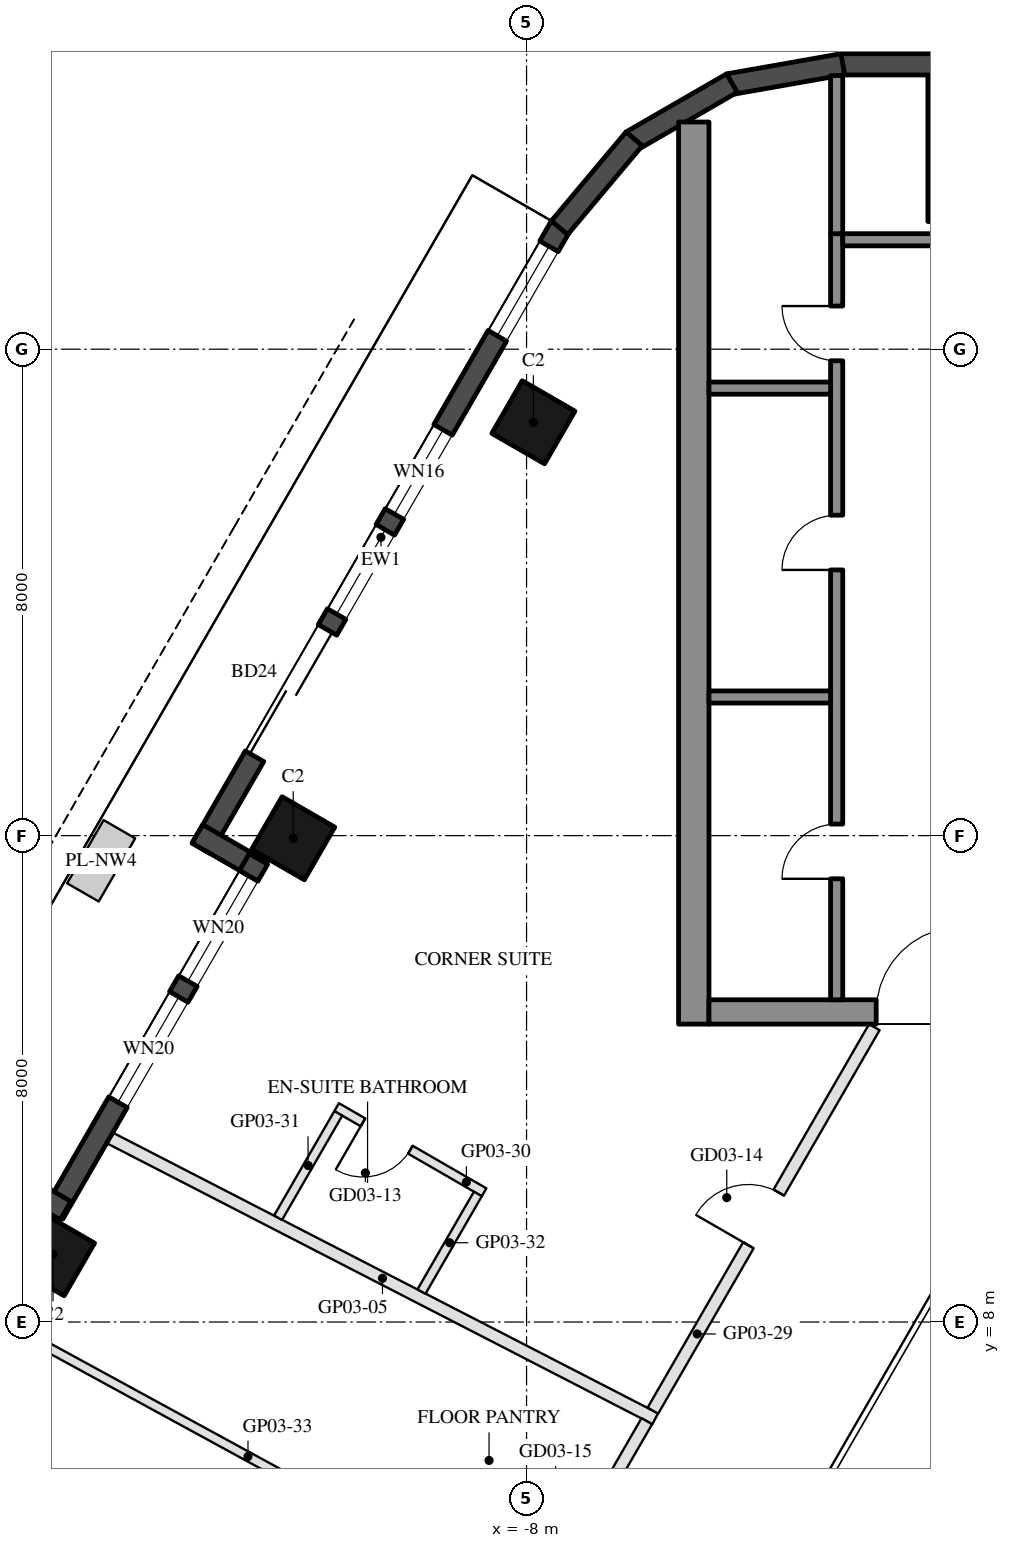
"""IFC4 building model, lengths in metres.
Left out: names, types, materials, properties, quantities, classifications, styles, units other than length and angle.
Written with IfcOpenShell. Run it as: python <this file> out.ifc"""

import sys

from ifc_helpers import new_model, si_unit, direction, frame, frame_2d, origin, origin_2d, place, context, subcontext, project, spatial, rectangle, hollow_rectangle, extrude, element, fill, save


model = new_model("IFC4")
c1 = context("Model", 3, precision=1e-05, world=origin(), true_north=direction((0.0, 1.0)))
c2 = subcontext(c1, "Body", "Model", "MODEL_VIEW")
j1 = project(units=[si_unit("LENGTHUNIT", "METRE"), si_unit("PLANEANGLEUNIT", "RADIAN")], contexts=[c1])
p1 = place(None, origin())
s1 = spatial("IfcSite", under=j1, at=p1, CompositionType="ELEMENT")
p2 = place(p1, origin())
s2 = spatial("IfcBuilding", under=s1, at=p2, CompositionType="ELEMENT")
p3 = place(p2, frame((0.0, 0.0, 65.0)))
s3 = spatial("IfcBuildingStorey", under=s2, at=p3, CompositionType="ELEMENT", Elevation=65.0)
for number, where, z_axis, x_axis in (
    (1, (-7.888, 22.798, 0.0), (0.0, 0.0, 1.0), (0.5, 0.866, 0.0)),
    (2, (-11.838, 15.957, 0.0), (0.0, 0.0, 1.0), (0.5, 0.866, 0.0)),
    (3, (-15.788, 9.115, 0.0), (0.0, 0.0, 1.0), (0.5, 0.866, 0.0)),
):
    element("IfcColumn", number, at=place(p3, frame(where, z_axis=z_axis, x_axis=x_axis)), inside=s3, PredefinedType="COLUMN", context=c2, shape_type="SweptSolid", body=[
        extrude(hollow_rectangle(XDim=1.0, YDim=1.0, WallThickness=0.045, at=origin_2d()), origin(), (0.0, 0.0, 1.0), 3.7),
    ])
p4 = place(p3, frame((0.0, 27.3, 0.0), z_axis=(0.0, 0.0, 1.0), x_axis=(1.0, 0.0, 0.0)))
e4 = element("IfcColumn", 4, at=p4, inside=s3, PredefinedType="COLUMN", context=c2, shape_type="SweptSolid", body=[
    extrude(hollow_rectangle(XDim=2.8, YDim=2.4, WallThickness=0.07, at=origin_2d()), origin(), (0.0, 0.0, 1.0), 3.7),
])
p5 = place(p3, frame((-7.441, 26.022, 0.0), z_axis=(0.0, 0.0, 1.0), x_axis=(-0.499992533062, -0.86602971478, 0.0)))
e5 = element("IfcWall", 5, at=p5, inside=s3, PredefinedType="SOLIDWALL", context=c2, shape_type="SweptSolid", body=[
    extrude(rectangle(XDim=11.816, YDim=0.35, at=frame_2d((5.908, 0.0))), origin(), (0.0, 0.0, 1.0), 3.55),
])
p6 = place(p5, frame((0.381, 0.0, 0.3)))
e6 = element("IfcOpeningElement", 6, at=p6, cuts=e5, PredefinedType="OPENING", context=c2, shape_type="SweptSolid", body=[
    extrude(rectangle(XDim=1.7, YDim=2.65, at=frame_2d((0.85, 1.325))), frame((0.0, 0.185, 0.0), z_axis=(0.0, -1.0, 0.0), x_axis=(1.0, 0.0, 0.0)), (0.0, 0.0, 1.0), 0.37),
])
p7 = place(p5, frame((7.666, 0.0, 0.0)))
e7 = element("IfcOpeningElement", 7, at=p7, cuts=e5, PredefinedType="OPENING", context=c2, shape_type="SweptSolid", body=[
    extrude(rectangle(XDim=2.4, YDim=2.4, at=frame_2d((1.2, 1.2))), frame((0.0, 0.185, 0.0), z_axis=(0.0, -1.0, 0.0), x_axis=(1.0, 0.0, 0.0)), (0.0, 0.0, 1.0), 0.37),
])
p8 = place(p5, frame((3.865, 0.0, 0.3)))
e8 = element("IfcOpeningElement", 8, at=p8, cuts=e5, PredefinedType="OPENING", context=c2, shape_type="SweptSolid", body=[
    extrude(rectangle(XDim=1.6, YDim=2.65, at=frame_2d((0.8, 1.325))), frame((0.0, 0.185, 0.0), z_axis=(0.0, -1.0, 0.0), x_axis=(1.0, 0.0, 0.0)), (0.0, 0.0, 1.0), 0.37),
])
p9 = place(p5, frame((5.765, 0.0, 0.3)))
e9 = element("IfcOpeningElement", 9, at=p9, cuts=e5, PredefinedType="OPENING", context=c2, shape_type="SweptSolid", body=[
    extrude(rectangle(XDim=1.6, YDim=2.65, at=frame_2d((0.8, 1.325))), frame((0.0, 0.185, 0.0), z_axis=(0.0, -1.0, 0.0), x_axis=(1.0, 0.0, 0.0)), (0.0, 0.0, 1.0), 0.37),
])
p10 = place(p3, frame((-13.413, 16.029, 0.0), z_axis=(0.0, 0.0, 1.0), x_axis=(0.866005645448, -0.500034220881, 0.0)))
e10 = element("IfcWall", 10, at=p10, inside=s3, PredefinedType="SOLIDWALL", context=c2, shape_type="SweptSolid", body=[
    extrude(rectangle(XDim=1.22, YDim=0.35, at=frame_2d((0.61, 0.0))), origin(), (0.0, 0.0, 1.0), 3.55),
])
p11 = place(p3, frame((-12.409, 15.617, 0.0), z_axis=(0.0, 0.0, 1.0), x_axis=(-0.500003597184, -0.866023326939, 0.0)))
e11 = element("IfcWall", 11, at=p11, inside=s3, PredefinedType="SOLIDWALL", context=c2, shape_type="SweptSolid", body=[
    extrude(rectangle(XDim=6.74, YDim=0.35, at=frame_2d((3.37, 0.0))), origin(), (0.0, 0.0, 1.0), 3.55),
])
p12 = place(p11, frame((0.32, 0.0, 0.3)))
e12 = element("IfcOpeningElement", 12, at=p12, cuts=e11, PredefinedType="OPENING", context=c2, shape_type="SweptSolid", body=[
    extrude(rectangle(XDim=2.0, YDim=2.65, at=frame_2d((1.0, 1.325))), frame((0.0, 0.185, 0.0), z_axis=(0.0, -1.0, 0.0), x_axis=(1.0, 0.0, 0.0)), (0.0, 0.0, 1.0), 0.37),
])
p13 = place(p11, frame((2.62, 0.0, 0.3)))
e13 = element("IfcOpeningElement", 13, at=p13, cuts=e11, PredefinedType="OPENING", context=c2, shape_type="SweptSolid", body=[
    extrude(rectangle(XDim=2.0, YDim=2.65, at=frame_2d((1.0, 1.325))), frame((0.0, 0.185, 0.0), z_axis=(0.0, -1.0, 0.0), x_axis=(1.0, 0.0, 0.0)), (0.0, 0.0, 1.0), 0.37),
])
p14 = place(p3, frame((-15.581, 9.833, 0.0), z_axis=(0.0, 0.0, 1.0), x_axis=(-0.866055662726, 0.499947586314, 0.0)))
e14 = element("IfcWall", 14, at=p14, inside=s3, PredefinedType="SOLIDWALL", context=c2, shape_type="SweptSolid", body=[
    extrude(rectangle(XDim=1.22, YDim=0.35, at=frame_2d((0.61, 0.0))), origin(), (0.0, 0.0, 1.0), 3.55),
])
p15 = place(p3, frame((2.829, 28.685, 0.0), z_axis=(0.0, 0.0, 1.0), x_axis=(-1.0, 0.0, 0.0)))
e15 = element("IfcWall", 15, at=p15, inside=s3, PredefinedType="SOLIDWALL", context=c2, shape_type="SweptSolid", body=[
    extrude(rectangle(XDim=5.658, YDim=0.35, at=frame_2d((2.829, 0.0))), origin(), (0.0, 0.0, 1.0), 3.55),
])
for number, where, z_axis, x_axis in (
    (16, (-2.799, 28.688, 0.0), (0.0, 0.0, 1.0), (-0.985, -0.174, 0.0)),
    (17, (-4.623, 28.377, 0.0), (0.0, 0.0, 1.0), (-0.866, -0.5, 0.0)),
):
    element("IfcWall", number, at=place(p3, frame(where, z_axis=z_axis, x_axis=x_axis)), inside=s3, PredefinedType="SOLIDWALL", context=c2, shape_type="SweptSolid", body=[
        extrude(rectangle(XDim=1.91, YDim=0.35, at=frame_2d((0.955, 0.0))), origin(), (0.0, 0.0, 1.0), 3.55),
    ])
p16 = place(p3, frame((-6.23, 27.461, 0.0), z_axis=(0.0, 0.0, 1.0), x_axis=(-0.642808304945, -0.766027077259, 0.0)))
e18 = element("IfcWall", 18, at=p16, inside=s3, PredefinedType="SOLIDWALL", context=c2, shape_type="SweptSolid", body=[
    extrude(rectangle(XDim=1.91, YDim=0.35, at=frame_2d((0.955, 0.0))), origin(), (0.0, 0.0, 1.0), 3.55),
])
p17 = place(p3, frame((-5.25, 12.9, 0.0), z_axis=(0.0, 0.0, 1.0), x_axis=(0.0, 1.0, 0.0)))
e19 = element("IfcWall", 19, at=p17, inside=s3, PredefinedType="SHEAR", context=c2, shape_type="SweptSolid", body=[
    extrude(rectangle(XDim=14.837, YDim=0.5, at=frame_2d((7.418, 0.0))), origin(), (0.0, 0.0, 1.0), 3.5),
])
p18 = place(p3, frame((5.0, 13.1, 0.0), z_axis=(0.0, 0.0, 1.0), x_axis=(-1.0, 0.0, 0.0)))
e20 = element("IfcWall", 20, at=p18, inside=s3, PredefinedType="SHEAR", context=c2, shape_type="SweptSolid", body=[
    extrude(rectangle(XDim=10.0, YDim=0.4, at=frame_2d((5.0, 0.0))), origin(), (0.0, 0.0, 1.0), 3.5),
])
p19 = place(p18, frame((3.55, 0.0, 0.0)))
e21 = element("IfcOpeningElement", 21, at=p19, cuts=e20, PredefinedType="OPENING", context=c2, shape_type="SweptSolid", body=[
    extrude(rectangle(XDim=1.1, YDim=2.1, at=frame_2d((0.55, 1.05))), frame((0.0, 0.21, 0.0), z_axis=(0.0, -1.0, 0.0), x_axis=(1.0, 0.0, 0.0)), (0.0, 0.0, 1.0), 0.42),
])
p20 = place(p18, frame((5.85, 0.0, 0.0)))
e22 = element("IfcOpeningElement", 22, at=p20, cuts=e20, PredefinedType="OPENING", context=c2, shape_type="SweptSolid", body=[
    extrude(rectangle(XDim=1.4, YDim=2.1, at=frame_2d((0.7, 1.05))), frame((0.0, 0.21, 0.0), z_axis=(0.0, -1.0, 0.0), x_axis=(1.0, 0.0, 0.0)), (0.0, 0.0, 1.0), 0.42),
])
p21 = place(p3, frame((-2.9, 13.3, 0.0), z_axis=(0.0, 0.0, 1.0), x_axis=(0.0, 1.0, 0.0)))
e23 = element("IfcWall", 23, at=p21, inside=s3, PredefinedType="SHEAR", context=c2, shape_type="SweptSolid", body=[
    extrude(rectangle(XDim=12.6, YDim=0.2, at=frame_2d((6.3, 0.0))), origin(), (0.0, 0.0, 1.0), 3.5),
])
p22 = place(p21, frame((1.99, 0.0, 0.0)))
e24 = element("IfcOpeningElement", 24, at=p22, cuts=e23, PredefinedType="OPENING", context=c2, shape_type="SweptSolid", body=[
    extrude(rectangle(XDim=0.9, YDim=2.1, at=frame_2d((0.45, 1.05))), frame((0.0, 0.11, 0.0), z_axis=(0.0, -1.0, 0.0), x_axis=(1.0, 0.0, 0.0)), (0.0, 0.0, 1.0), 0.22),
])
p23 = place(p21, frame((7.07, 0.0, 0.0)))
e25 = element("IfcOpeningElement", 25, at=p23, cuts=e23, PredefinedType="OPENING", context=c2, shape_type="SweptSolid", body=[
    extrude(rectangle(XDim=0.9, YDim=2.1, at=frame_2d((0.45, 1.05))), frame((0.0, 0.11, 0.0), z_axis=(0.0, -1.0, 0.0), x_axis=(1.0, 0.0, 0.0)), (0.0, 0.0, 1.0), 0.22),
])
p24 = place(p21, frame((10.51, 0.0, 0.0)))
e26 = element("IfcOpeningElement", 26, at=p24, cuts=e23, PredefinedType="OPENING", context=c2, shape_type="SweptSolid", body=[
    extrude(rectangle(XDim=0.9, YDim=2.1, at=frame_2d((0.45, 1.05))), frame((0.0, 0.11, 0.0), z_axis=(0.0, -1.0, 0.0), x_axis=(1.0, 0.0, 0.0)), (0.0, 0.0, 1.0), 0.22),
])
p25 = place(p3, frame((-0.4, 25.8, 0.0), z_axis=(0.0, 0.0, 1.0), x_axis=(-1.0, 0.0, 0.0)))
e27 = element("IfcWall", 27, at=p25, inside=s3, PredefinedType="SHEAR", context=c2, shape_type="SweptSolid", body=[
    extrude(rectangle(XDim=2.4, YDim=0.2, at=frame_2d((1.2, 0.0))), origin(), (0.0, 0.0, 1.0), 3.5),
])
for number, where, z_axis, x_axis in (
    (28, (-3.0, 18.28, 0.0), (0.0, 0.0, 1.0), (-1.0, 0.0, 0.0)),
    (29, (-3.0, 23.36, 0.0), (0.0, 0.0, 1.0), (-1.0, 0.0, 0.0)),
):
    element("IfcWall", number, at=place(p3, frame(where, z_axis=z_axis, x_axis=x_axis)), inside=s3, PredefinedType="SHEAR", context=c2, shape_type="SweptSolid", body=[
        extrude(rectangle(XDim=2.0, YDim=0.2, at=frame_2d((1.0, 0.0))), origin(), (0.0, 0.0, 1.0), 3.5),
    ])
p26 = place(p3, frame((-2.9, 25.9, 0.0), z_axis=(0.0, 0.0, 1.0), x_axis=(0.0, 1.0, 0.0)))
e30 = element("IfcWall", 30, at=p26, inside=s3, PredefinedType="SHEAR", context=c2, shape_type="SweptSolid", body=[
    extrude(rectangle(XDim=2.6, YDim=0.2, at=frame_2d((1.3, 0.0))), origin(), (0.0, 0.0, 1.0), 3.5),
])
p27 = place(p3, frame((-14.856, 11.029, 0.0), z_axis=(0.0, 0.0, 1.0), x_axis=(0.889105841633, -0.457701652142, 0.0)))
e31 = element("IfcWall", 31, at=p27, inside=s3, PredefinedType="PARTITIONING", context=c2, shape_type="SweptSolid", body=[
    extrude(rectangle(XDim=10.092, YDim=0.2, at=frame_2d((5.046, 0.0))), origin(), (0.0, 0.0, 1.0), 2.96),
])
p28 = place(p3, frame((-5.922, 6.542, 0.0), z_axis=(0.0, 0.0, 1.0), x_axis=(0.499989401968, 0.866031522475, 0.0)))
e32 = element("IfcWall", 32, at=p28, inside=s3, PredefinedType="PARTITIONING", context=c2, shape_type="SweptSolid", body=[
    extrude(rectangle(XDim=7.283, YDim=0.2, at=frame_2d((3.642, 0.0))), origin(), (0.0, 0.0, 1.0), 2.95),
])
p29 = place(p28, frame((3.142, 0.0, 0.0)))
e33 = element("IfcOpeningElement", 33, at=p29, cuts=e32, PredefinedType="OPENING", context=c2, shape_type="SweptSolid", body=[
    extrude(rectangle(XDim=1.0, YDim=2.1, at=frame_2d((0.5, 1.05))), frame((0.0, 0.11, 0.0), z_axis=(0.0, -1.0, 0.0), x_axis=(1.0, 0.0, 0.0)), (0.0, 0.0, 1.0), 0.22),
])
p30 = place(p3, frame((-8.698, 10.134, 0.0), z_axis=(0.0, 0.0, 1.0), x_axis=(-0.866034573852, 0.49998411664, 0.0)))
e34 = element("IfcWall", 34, at=p30, inside=s3, PredefinedType="PARTITIONING", context=c2, shape_type="SweptSolid", body=[
    extrude(rectangle(XDim=2.8, YDim=0.15, at=frame_2d((1.4, 0.0))), origin(), (0.0, 0.0, 1.0), 3.55),
])
p31 = place(p30, frame((1.4, 0.0, 0.0)))
e35 = element("IfcOpeningElement", 35, at=p31, cuts=e34, PredefinedType="OPENING", context=c2, shape_type="SweptSolid", body=[
    extrude(rectangle(XDim=0.9, YDim=2.1, at=frame_2d((0.45, 1.05))), frame((0.0, 0.085, 0.0), z_axis=(0.0, -1.0, 0.0), x_axis=(1.0, 0.0, 0.0)), (0.0, 0.0, 1.0), 0.17),
])
p32 = place(p3, frame((-11.096, 11.432, 0.0), z_axis=(0.0, 0.0, 1.0), x_axis=(-0.500035331196, -0.866005004348, 0.0)))
e36 = element("IfcWall", 36, at=p32, inside=s3, PredefinedType="PARTITIONING", context=c2, shape_type="SweptSolid", body=[
    extrude(rectangle(XDim=1.981, YDim=0.15, at=frame_2d((0.991, 0.0))), origin(), (0.0, 0.0, 1.0), 2.95),
])
p33 = place(p3, frame((-8.801, 10.107, 0.0), z_axis=(0.0, 0.0, 1.0), x_axis=(-0.499992292652, -0.866029853578, 0.0)))
e37 = element("IfcWall", 37, at=p33, inside=s3, PredefinedType="PARTITIONING", context=c2, shape_type="SweptSolid", body=[
    extrude(rectangle(XDim=1.854, YDim=0.15, at=frame_2d((0.927, 0.0))), origin(), (0.0, 0.0, 1.0), 2.95),
])
p34 = place(p3, frame((-17.402, 8.419, 0.0), z_axis=(0.0, 0.0, 1.0), x_axis=(0.877831004422, -0.47897048727, 0.0)))
e38 = element("IfcWall", 38, at=p34, inside=s3, PredefinedType="PARTITIONING", context=c2, shape_type="SweptSolid", body=[
    extrude(rectangle(XDim=10.983, YDim=0.15, at=frame_2d((5.492, 0.0))), origin(), (0.0, 0.0, 1.0), 2.96),
])
p35 = place(p3, frame((-7.811, 3.271, 0.0), z_axis=(0.0, 0.0, 1.0), x_axis=(0.4999705729, 0.866042392862, 0.0)))
e39 = element("IfcWall", 39, at=p35, inside=s3, PredefinedType="PARTITIONING", context=c2, shape_type="SweptSolid", body=[
    extrude(rectangle(XDim=3.577, YDim=0.2, at=frame_2d((1.789, 0.0))), origin(), (0.0, 0.0, 1.0), 2.95),
])
p36 = place(p35, frame((1.339, 0.0, 0.0)))
e40 = element("IfcOpeningElement", 40, at=p36, cuts=e39, PredefinedType="OPENING", context=c2, shape_type="SweptSolid", body=[
    extrude(rectangle(XDim=0.9, YDim=2.1, at=frame_2d((0.45, 1.05))), frame((0.0, 0.11, 0.0), z_axis=(0.0, -1.0, 0.0), x_axis=(1.0, 0.0, 0.0)), (0.0, 0.0, 1.0), 0.22),
])
p37 = place(p6, origin())
e41 = element("IfcWindow", 41, at=p37, inside=s3, PartitioningType="SINGLE_PANEL", PredefinedType="WINDOW", context=c2, shape_type="SweptSolid", body=[
    extrude(rectangle(XDim=1.7, YDim=2.65, at=frame_2d((0.85, 1.325))), frame((0.0, 0.03, 0.0), z_axis=(0.0, -1.0, 0.0), x_axis=(1.0, 0.0, 0.0)), (0.0, 0.0, 1.0), 0.06),
])
fill(e6, e41)
p38 = place(p7, frame((2.4, 0.0, 0.0), z_axis=(0.0, 0.0, 1.0), x_axis=(-1.0, 0.0, 0.0)))
e42 = element("IfcDoor", 42, at=p38, inside=s3, OperationType="SLIDING_TO_LEFT", PredefinedType="DOOR", context=c2, shape_type="SweptSolid", body=[
    extrude(rectangle(XDim=2.4, YDim=2.4, at=frame_2d((1.2, 1.2))), frame((0.0, 0.025, 0.0), z_axis=(0.0, -1.0, 0.0), x_axis=(1.0, 0.0, 0.0)), (0.0, 0.0, 1.0), 0.05),
])
fill(e7, e42)
p39 = place(p8, origin())
e43 = element("IfcWindow", 43, at=p39, inside=s3, PartitioningType="SINGLE_PANEL", PredefinedType="WINDOW", context=c2, shape_type="SweptSolid", body=[
    extrude(rectangle(XDim=1.6, YDim=2.65, at=frame_2d((0.8, 1.325))), frame((0.0, 0.03, 0.0), z_axis=(0.0, -1.0, 0.0), x_axis=(1.0, 0.0, 0.0)), (0.0, 0.0, 1.0), 0.06),
])
fill(e8, e43)
p40 = place(p9, origin())
e44 = element("IfcWindow", 44, at=p40, inside=s3, PartitioningType="SINGLE_PANEL", PredefinedType="WINDOW", context=c2, shape_type="SweptSolid", body=[
    extrude(rectangle(XDim=1.6, YDim=2.65, at=frame_2d((0.8, 1.325))), frame((0.0, 0.03, 0.0), z_axis=(0.0, -1.0, 0.0), x_axis=(1.0, 0.0, 0.0)), (0.0, 0.0, 1.0), 0.06),
])
fill(e9, e44)
p41 = place(p12, origin())
e45 = element("IfcWindow", 45, at=p41, inside=s3, PartitioningType="SINGLE_PANEL", PredefinedType="WINDOW", context=c2, shape_type="SweptSolid", body=[
    extrude(rectangle(XDim=2.0, YDim=2.65, at=frame_2d((1.0, 1.325))), frame((0.0, 0.03, 0.0), z_axis=(0.0, -1.0, 0.0), x_axis=(1.0, 0.0, 0.0)), (0.0, 0.0, 1.0), 0.06),
])
fill(e12, e45)
p42 = place(p13, origin())
e46 = element("IfcWindow", 46, at=p42, inside=s3, PartitioningType="SINGLE_PANEL", PredefinedType="WINDOW", context=c2, shape_type="SweptSolid", body=[
    extrude(rectangle(XDim=2.0, YDim=2.65, at=frame_2d((1.0, 1.325))), frame((0.0, 0.03, 0.0), z_axis=(0.0, -1.0, 0.0), x_axis=(1.0, 0.0, 0.0)), (0.0, 0.0, 1.0), 0.06),
])
fill(e13, e46)
p43 = place(p22, origin())
e47 = element("IfcDoor", 47, at=p43, inside=s3, OperationType="SINGLE_SWING_LEFT", PredefinedType="DOOR", context=c2, shape_type="SweptSolid", body=[
    extrude(rectangle(XDim=0.9, YDim=2.1, at=frame_2d((0.45, 1.05))), frame((0.0, 0.025, 0.0), z_axis=(0.0, -1.0, 0.0), x_axis=(1.0, 0.0, 0.0)), (0.0, 0.0, 1.0), 0.05),
])
fill(e24, e47)
p44 = place(p23, origin())
e48 = element("IfcDoor", 48, at=p44, inside=s3, OperationType="SINGLE_SWING_LEFT", PredefinedType="DOOR", context=c2, shape_type="SweptSolid", body=[
    extrude(rectangle(XDim=0.9, YDim=2.1, at=frame_2d((0.45, 1.05))), frame((0.0, 0.025, 0.0), z_axis=(0.0, -1.0, 0.0), x_axis=(1.0, 0.0, 0.0)), (0.0, 0.0, 1.0), 0.05),
])
fill(e25, e48)
p45 = place(p24, origin())
e49 = element("IfcDoor", 49, at=p45, inside=s3, OperationType="SINGLE_SWING_RIGHT", PredefinedType="DOOR", context=c2, shape_type="SweptSolid", body=[
    extrude(rectangle(XDim=0.9, YDim=2.1, at=frame_2d((0.45, 1.05))), frame((0.0, 0.025, 0.0), z_axis=(0.0, -1.0, 0.0), x_axis=(1.0, 0.0, 0.0)), (0.0, 0.0, 1.0), 0.05),
])
fill(e26, e49)
p46 = place(p20, frame((1.4, 0.0, 0.0), z_axis=(0.0, 0.0, 1.0), x_axis=(-1.0, 0.0, 0.0)))
e50 = element("IfcDoor", 50, at=p46, inside=s3, OperationType="DOUBLE_DOOR_SINGLE_SWING", PredefinedType="DOOR", context=c2, shape_type="SweptSolid", body=[
    extrude(rectangle(XDim=1.4, YDim=2.1, at=frame_2d((0.7, 1.05))), frame((0.0, 0.025, 0.0), z_axis=(0.0, -1.0, 0.0), x_axis=(1.0, 0.0, 0.0)), (0.0, 0.0, 1.0), 0.05),
])
fill(e22, e50)
p47 = place(p31, origin())
e51 = element("IfcDoor", 51, at=p47, inside=s3, OperationType="SINGLE_SWING_RIGHT", PredefinedType="DOOR", context=c2, shape_type="SweptSolid", body=[
    extrude(rectangle(XDim=0.9, YDim=2.1, at=frame_2d((0.45, 1.05))), frame((0.0, 0.025, 0.0), z_axis=(0.0, -1.0, 0.0), x_axis=(1.0, 0.0, 0.0)), (0.0, 0.0, 1.0), 0.05),
])
fill(e35, e51)
p48 = place(p29, origin())
e52 = element("IfcDoor", 52, at=p48, inside=s3, OperationType="SINGLE_SWING_LEFT", PredefinedType="DOOR", context=c2, shape_type="SweptSolid", body=[
    extrude(rectangle(XDim=1.0, YDim=2.1, at=frame_2d((0.5, 1.05))), frame((0.0, 0.025, 0.0), z_axis=(0.0, -1.0, 0.0), x_axis=(1.0, 0.0, 0.0)), (0.0, 0.0, 1.0), 0.05),
])
fill(e33, e52)
save(model, sys.argv[1])
